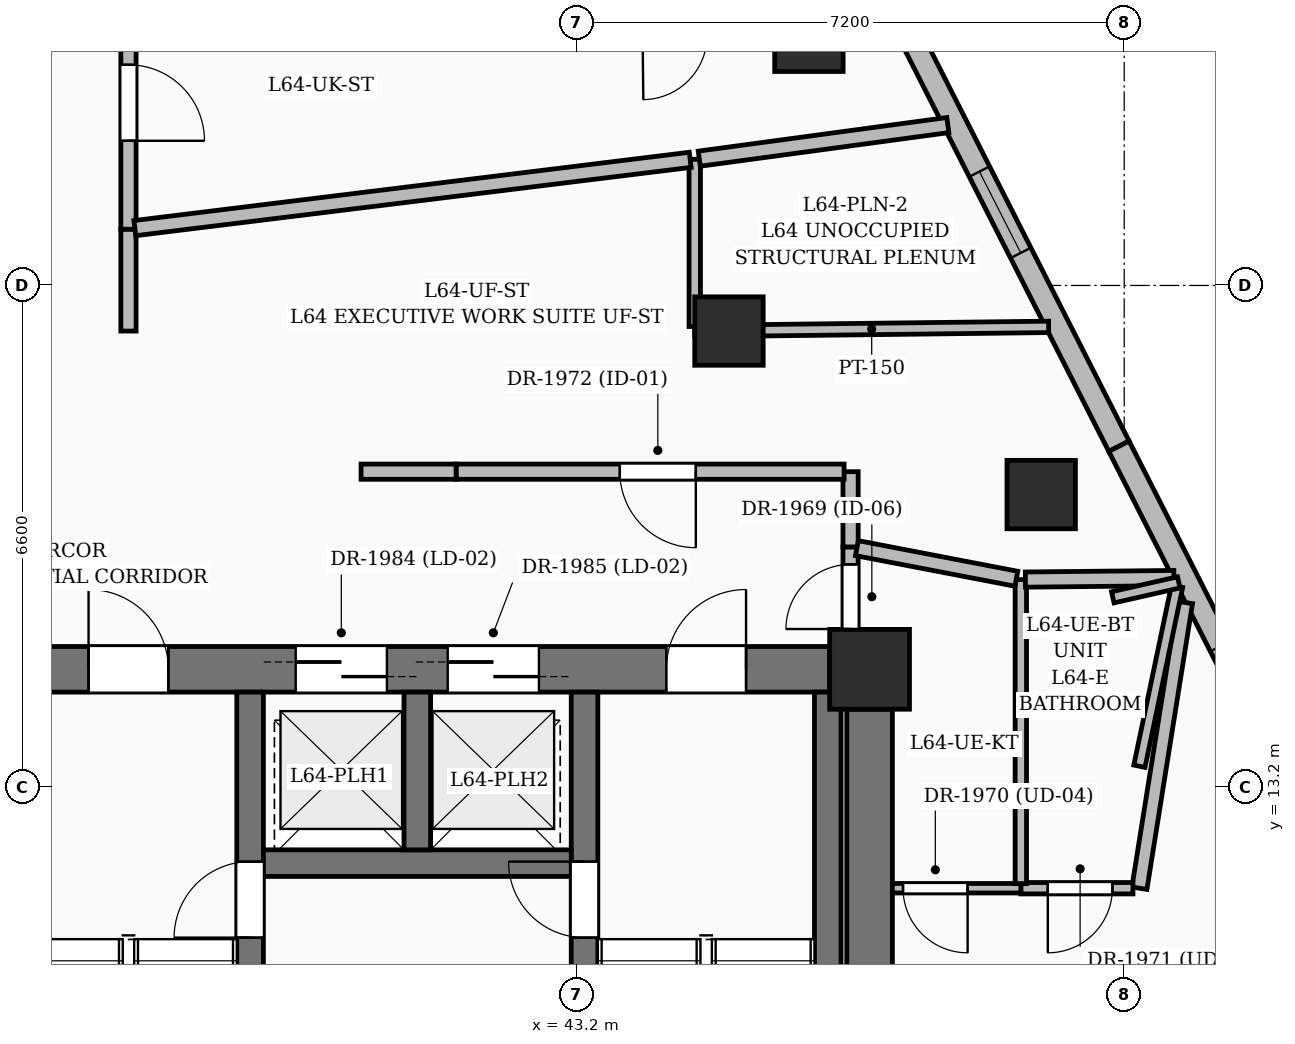
"""IFC4 building model, lengths in metres.
Left out: names, types, materials, properties, quantities, classifications, styles, units other than length and angle.
Written with IfcOpenShell. Run it as: python <this file> out.ifc"""

import sys

from ifc_helpers import new_model, si_unit, direction, frame, frame_2d, origin, origin_2d, place, context, subcontext, project, spatial, rectangle, extrude, element, fill, save


model = new_model("IFC4")
c1 = context("Model", 3, precision=1e-05, world=origin(), true_north=direction((0.0, 1.0)))
c2 = subcontext(c1, "Body", "Model", "MODEL_VIEW")
j1 = project(units=[si_unit("LENGTHUNIT", "METRE"), si_unit("PLANEANGLEUNIT", "RADIAN")], contexts=[c1])
p1 = place(None, origin())
s1 = spatial("IfcSite", under=j1, at=p1, CompositionType="ELEMENT")
p2 = place(p1, origin())
s2 = spatial("IfcBuilding", under=s1, at=p2, CompositionType="ELEMENT")
p3 = place(p2, frame((0.0, 0.0, 248.25)))
s3 = spatial("IfcBuildingStorey", under=s2, at=p3, CompositionType="ELEMENT", Elevation=248.25)
p4 = place(p3, frame((47.05, 14.75, 0.0), z_axis=(0.0, 0.0, 1.0), x_axis=(1.0, 0.0, 0.0)))
e1 = element("IfcColumn", 1, at=p4, inside=s3, PredefinedType="COLUMN", context=c2, shape_type="SweptSolid", body=[
    extrude(rectangle(XDim=1.05, YDim=1.05, at=origin_2d()), origin(), (0.0, 0.0, 1.0), 3.75),
])
p5 = place(p3, frame((45.2, 19.2, 0.0), z_axis=(0.0, 0.0, 1.0), x_axis=(1.0, 0.0, 0.0)))
e2 = element("IfcColumn", 2, at=p5, inside=s3, PredefinedType="COLUMN", context=c2, shape_type="SweptSolid", body=[
    extrude(rectangle(XDim=0.9, YDim=0.9, at=origin_2d()), origin(), (0.0, 0.0, 1.0), 3.75),
])
p6 = place(p3, frame((35.675, 14.75, 0.0), z_axis=(0.0, 0.0, 1.0), x_axis=(1.0, 0.0, 0.0)))
e3 = element("IfcWall", 3, at=p6, inside=s3, PredefinedType="SHEAR", context=c2, shape_type="SweptSolid", body=[
    extrude(rectangle(XDim=10.85, YDim=0.6, at=frame_2d((5.425, 0.0))), origin(), (0.0, 0.0, 1.0), 3.75),
])
p7 = place(p6, frame((1.1, 0.0, 0.0)))
e4 = element("IfcOpeningElement", 4, at=p7, cuts=e3, PredefinedType="OPENING", context=c2, shape_type="SweptSolid", body=[
    extrude(rectangle(XDim=1.05, YDim=2.15, at=frame_2d((0.525, 1.075))), frame((0.0, 0.31, 0.0), z_axis=(0.0, -1.0, 0.0), x_axis=(1.0, 0.0, 0.0)), (0.0, 0.0, 1.0), 0.62),
])
p8 = place(p6, frame((8.7, 0.0, 0.0)))
e5 = element("IfcOpeningElement", 5, at=p8, cuts=e3, PredefinedType="OPENING", context=c2, shape_type="SweptSolid", body=[
    extrude(rectangle(XDim=1.05, YDim=2.15, at=frame_2d((0.525, 1.075))), frame((0.0, 0.31, 0.0), z_axis=(0.0, -1.0, 0.0), x_axis=(1.0, 0.0, 0.0)), (0.0, 0.0, 1.0), 0.62),
])
p9 = place(p6, frame((3.825, 0.0, 0.0)))
e6 = element("IfcOpeningElement", 6, at=p9, cuts=e3, PredefinedType="OPENING", context=c2, shape_type="SweptSolid", body=[
    extrude(rectangle(XDim=1.2, YDim=2.2, at=frame_2d((0.6, 1.1))), frame((0.0, 0.31, 0.0), z_axis=(0.0, -1.0, 0.0), x_axis=(1.0, 0.0, 0.0)), (0.0, 0.0, 1.0), 0.62),
])
p10 = place(p6, frame((5.825, 0.0, 0.0)))
e7 = element("IfcOpeningElement", 7, at=p10, cuts=e3, PredefinedType="OPENING", context=c2, shape_type="SweptSolid", body=[
    extrude(rectangle(XDim=1.2, YDim=2.2, at=frame_2d((0.6, 1.1))), frame((0.0, 0.31, 0.0), z_axis=(0.0, -1.0, 0.0), x_axis=(1.0, 0.0, 0.0)), (0.0, 0.0, 1.0), 0.62),
])
p11 = place(p3, frame((47.05, 5.075, 0.0), z_axis=(0.0, 0.0, 1.0), x_axis=(0.0, 1.0, 0.0)))
e8 = element("IfcWall", 8, at=p11, inside=s3, PredefinedType="SHEAR", context=c2, shape_type="SweptSolid", body=[
    extrude(rectangle(XDim=9.15, YDim=0.6, at=frame_2d((4.575, 0.0))), origin(), (0.0, 0.0, 1.0), 3.75),
])
p12 = place(p3, frame((38.9, 5.2, 0.0), z_axis=(0.0, 0.0, 1.0), x_axis=(0.0, 1.0, 0.0)))
e9 = element("IfcWall", 9, at=p12, inside=s3, PredefinedType="SOLIDWALL", context=c2, shape_type="SweptSolid", body=[
    extrude(rectangle(XDim=9.25, YDim=0.35, at=frame_2d((4.625, 0.0))), origin(), (0.0, 0.0, 1.0), 3.75),
])
p13 = place(p12, frame((6.02, 0.0, 0.0)))
e10 = element("IfcOpeningElement", 10, at=p13, cuts=e9, PredefinedType="OPENING", context=c2, shape_type="SweptSolid", body=[
    extrude(rectangle(XDim=1.0, YDim=2.15, at=frame_2d((0.5, 1.075))), frame((0.0, 0.185, 0.0), z_axis=(0.0, -1.0, 0.0), x_axis=(1.0, 0.0, 0.0)), (0.0, 0.0, 1.0), 0.37),
])
p14 = place(p3, frame((43.3, 5.2, 0.0), z_axis=(0.0, 0.0, 1.0), x_axis=(0.0, 1.0, 0.0)))
e11 = element("IfcWall", 11, at=p14, inside=s3, PredefinedType="SOLIDWALL", context=c2, shape_type="SweptSolid", body=[
    extrude(rectangle(XDim=9.25, YDim=0.35, at=frame_2d((4.625, 0.0))), origin(), (0.0, 0.0, 1.0), 3.75),
])
p15 = place(p14, frame((6.02, 0.0, 0.0)))
e12 = element("IfcOpeningElement", 12, at=p15, cuts=e11, PredefinedType="OPENING", context=c2, shape_type="SweptSolid", body=[
    extrude(rectangle(XDim=1.0, YDim=2.15, at=frame_2d((0.5, 1.075))), frame((0.0, 0.185, 0.0), z_axis=(0.0, -1.0, 0.0), x_axis=(1.0, 0.0, 0.0)), (0.0, 0.0, 1.0), 0.37),
])
p16 = place(p3, frame((46.5, 5.2, 0.0), z_axis=(0.0, 0.0, 1.0), x_axis=(0.0, 1.0, 0.0)))
e13 = element("IfcWall", 13, at=p16, inside=s3, PredefinedType="SOLIDWALL", context=c2, shape_type="SweptSolid", body=[
    extrude(rectangle(XDim=9.25, YDim=0.35, at=frame_2d((4.625, 0.0))), origin(), (0.0, 0.0, 1.0), 3.75),
])
p17 = place(p3, frame((39.075, 12.2, 0.0), z_axis=(0.0, 0.0, 1.0), x_axis=(1.0, 0.0, 0.0)))
e14 = element("IfcWall", 14, at=p17, inside=s3, PredefinedType="SOLIDWALL", context=c2, shape_type="SweptSolid", body=[
    extrude(rectangle(XDim=4.05, YDim=0.35, at=frame_2d((2.025, 0.0))), origin(), (0.0, 0.0, 1.0), 3.75),
])
p18 = place(p3, frame((41.1, 12.375, 0.0), z_axis=(0.0, 0.0, 1.0), x_axis=(0.0, 1.0, 0.0)))
e15 = element("IfcWall", 15, at=p18, inside=s3, PredefinedType="SOLIDWALL", context=c2, shape_type="SweptSolid", body=[
    extrude(rectangle(XDim=2.075, YDim=0.35, at=frame_2d((1.038, 0.0))), origin(), (0.0, 0.0, 1.0), 3.75),
])
for number, where, z_axis, x_axis in (
    (16, (49.308, 17.049, 0.0), (0.0, 0.0, 1.0), (1.0, 0.0, 0.0)),
    (17, (46.252, 23.065, 0.0), (0.0, 0.0, 1.0), (1.0, 0.0, 0.0)),
):
    element("IfcColumn", number, at=place(p3, frame(where, z_axis=z_axis, x_axis=x_axis)), inside=s3, PredefinedType="COLUMN", context=c2, shape_type="SweptSolid", body=[
        extrude(rectangle(XDim=0.9, YDim=0.9, at=origin_2d()), origin(), (0.0, 0.0, 1.0), 3.75),
    ])
p19 = place(p3, frame((47.297, 23.656, 0.0), z_axis=(0.0, 0.0, 1.0), x_axis=(0.452876034441, -0.891573495248, 0.0)))
e18 = element("IfcWall", 18, at=p19, inside=s3, PredefinedType="SOLIDWALL", context=c2, shape_type="SweptSolid", body=[
    extrude(rectangle(XDim=6.698, YDim=0.3, at=frame_2d((3.349, 0.0))), origin(), (0.0, 0.0, 1.0), 3.5),
])
p20 = place(p19, frame((2.645, 0.0, 0.8)))
e19 = element("IfcOpeningElement", 19, at=p20, cuts=e18, PredefinedType="OPENING", context=c2, shape_type="SweptSolid", body=[
    extrude(rectangle(XDim=1.2, YDim=1.8, at=frame_2d((0.6, 0.9))), frame((0.0, 0.16, 0.0), z_axis=(0.0, -1.0, 0.0), x_axis=(1.0, 0.0, 0.0)), (0.0, 0.0, 1.0), 0.32),
])
p21 = place(p3, frame((50.331, 17.684, 0.0), z_axis=(0.0, 0.0, 1.0), x_axis=(0.452886204096, -0.891568329484, 0.0)))
e20 = element("IfcWall", 20, at=p21, inside=s3, PredefinedType="SOLIDWALL", context=c2, shape_type="SweptSolid", body=[
    extrude(rectangle(XDim=6.978, YDim=0.3, at=frame_2d((3.489, 0.0))), origin(), (0.0, 0.0, 1.0), 3.5),
])
p22 = place(p21, frame((2.95, 0.0, 0.6)))
e21 = element("IfcOpeningElement", 21, at=p22, cuts=e20, PredefinedType="OPENING", context=c2, shape_type="SweptSolid", body=[
    extrude(rectangle(XDim=2.4, YDim=2.1, at=frame_2d((1.2, 1.05))), frame((0.0, 0.16, 0.0), z_axis=(0.0, -1.0, 0.0), x_axis=(1.0, 0.0, 0.0)), (0.0, 0.0, 1.0), 0.32),
])
p23 = place(p3, frame((46.8, 15.05, 0.0), z_axis=(0.0, 0.0, 1.0), x_axis=(0.0, 1.0, 0.0)))
e22 = element("IfcWall", 22, at=p23, inside=s3, PredefinedType="PARTITIONING", context=c2, shape_type="SweptSolid", body=[
    extrude(rectangle(XDim=1.31, YDim=0.2, at=frame_2d((0.655, 0.0))), origin(), (0.0, 0.0, 1.0), 2.685),
])
p24 = place(p23, frame((0.23, 0.0, 0.0)))
e23 = element("IfcOpeningElement", 23, at=p24, cuts=e22, PredefinedType="OPENING", context=c2, shape_type="SweptSolid", body=[
    extrude(rectangle(XDim=0.85, YDim=2.1, at=frame_2d((0.425, 1.05))), frame((0.0, 0.11, 0.0), z_axis=(0.0, -1.0, 0.0), x_axis=(1.0, 0.0, 0.0)), (0.0, 0.0, 1.0), 0.22),
])
p25 = place(p3, frame((46.8, 16.36, 0.0), z_axis=(0.0, 0.0, 1.0), x_axis=(0.0, 1.0, 0.0)))
e24 = element("IfcWall", 24, at=p25, inside=s3, PredefinedType="PARTITIONING", context=c2, shape_type="SweptSolid", body=[
    extrude(rectangle(XDim=0.99, YDim=0.2, at=frame_2d((0.495, 0.0))), origin(), (0.0, 0.0, 1.0), 3.5),
])
p26 = place(p3, frame((46.715, 17.35, 0.0), z_axis=(0.0, 0.0, 1.0), x_axis=(-1.0, 0.0, 0.0)))
e25 = element("IfcWall", 25, at=p26, inside=s3, PredefinedType="PARTITIONING", context=c2, shape_type="SweptSolid", body=[
    extrude(rectangle(XDim=5.105, YDim=0.2, at=frame_2d((2.552, 0.0))), origin(), (0.0, 0.0, 1.0), 2.685),
])
p27 = place(p26, frame((1.951, 0.0, 0.0)))
e26 = element("IfcOpeningElement", 26, at=p27, cuts=e25, PredefinedType="OPENING", context=c2, shape_type="SweptSolid", body=[
    extrude(rectangle(XDim=1.0, YDim=2.2, at=frame_2d((0.5, 1.1))), frame((0.0, 0.11, 0.0), z_axis=(0.0, -1.0, 0.0), x_axis=(1.0, 0.0, 0.0)), (0.0, 0.0, 1.0), 0.22),
])
p28 = place(p3, frame((37.3, 19.2, 0.0), z_axis=(0.0, 0.0, 1.0), x_axis=(0.0, 1.0, 0.0)))
e27 = element("IfcWall", 27, at=p28, inside=s3, PredefinedType="PARTITIONING", context=c2, shape_type="SweptSolid", body=[
    extrude(rectangle(XDim=1.34, YDim=0.2, at=frame_2d((0.67, 0.0))), origin(), (0.0, 0.0, 1.0), 3.5),
])
p29 = place(p3, frame((37.3, 23.98, 0.0), z_axis=(0.0, 0.0, 1.0), x_axis=(0.0, -1.0, 0.0)))
e28 = element("IfcWall", 28, at=p29, inside=s3, PredefinedType="PARTITIONING", context=c2, shape_type="SweptSolid", body=[
    extrude(rectangle(XDim=3.44, YDim=0.2, at=frame_2d((1.72, 0.0))), origin(), (0.0, 0.0, 1.0), 3.5),
])
p30 = place(p29, frame((1.277, 0.0, 0.0)))
e29 = element("IfcOpeningElement", 29, at=p30, cuts=e28, PredefinedType="OPENING", context=c2, shape_type="SweptSolid", body=[
    extrude(rectangle(XDim=1.0, YDim=2.2, at=frame_2d((0.5, 1.1))), frame((0.0, 0.11, 0.0), z_axis=(0.0, -1.0, 0.0), x_axis=(1.0, 0.0, 0.0)), (0.0, 0.0, 1.0), 0.22),
])
p31 = place(p3, frame((51.2, 15.63, 0.0), z_axis=(0.0, 0.0, 1.0), x_axis=(-0.157552821355, -0.987510561201, 0.0)))
e30 = element("IfcWall", 30, at=p31, inside=s3, PredefinedType="PARTITIONING", context=c2, shape_type="SweptSolid", body=[
    extrude(rectangle(XDim=3.807, YDim=0.2, at=frame_2d((1.904, 0.0))), origin(), (0.0, 0.0, 1.0), 2.82),
])
p32 = place(p3, frame((50.515, 11.87, 0.0), z_axis=(0.0, 0.0, 1.0), x_axis=(-1.0, 0.0, 0.0)))
e31 = element("IfcWall", 31, at=p32, inside=s3, PredefinedType="PARTITIONING", context=c2, shape_type="SweptSolid", body=[
    extrude(rectangle(XDim=1.475, YDim=0.15, at=frame_2d((0.737, 0.0))), origin(), (0.0, 0.0, 1.0), 3.5),
])
p33 = place(p32, frame((0.27, 0.0, 0.0)))
e32 = element("IfcOpeningElement", 32, at=p33, cuts=e31, PredefinedType="OPENING", context=c2, shape_type="SweptSolid", body=[
    extrude(rectangle(XDim=0.85, YDim=2.1, at=frame_2d((0.425, 1.05))), frame((0.0, 0.085, 0.0), z_axis=(0.0, -1.0, 0.0), x_axis=(1.0, 0.0, 0.0)), (0.0, 0.0, 1.0), 0.17),
])
p34 = place(p3, frame((49.04, 11.87, 0.0), z_axis=(0.0, 0.0, 1.0), x_axis=(-1.0, 0.0, 0.0)))
e33 = element("IfcWall", 33, at=p34, inside=s3, PredefinedType="PARTITIONING", context=c2, shape_type="SweptSolid", body=[
    extrude(rectangle(XDim=1.69, YDim=0.125, at=frame_2d((0.845, 0.0))), origin(), (0.0, 0.0, 1.0), 3.5),
])
p35 = place(p34, frame((0.7, 0.0, 0.0)))
e34 = element("IfcOpeningElement", 34, at=p35, cuts=e33, PredefinedType="OPENING", context=c2, shape_type="SweptSolid", body=[
    extrude(rectangle(XDim=0.85, YDim=2.1, at=frame_2d((0.425, 1.05))), frame((0.0, 0.072, 0.0), z_axis=(0.0, -1.0, 0.0), x_axis=(1.0, 0.0, 0.0)), (0.0, 0.0, 1.0), 0.145),
])
p36 = place(p3, frame((49.04, 15.93, 0.0), z_axis=(0.0, 0.0, 1.0), x_axis=(0.0, -1.0, 0.0)))
e35 = element("IfcWall", 35, at=p36, inside=s3, PredefinedType="PARTITIONING", context=c2, shape_type="SweptSolid", body=[
    extrude(rectangle(XDim=4.0, YDim=0.15, at=frame_2d((2.0, 0.0))), origin(), (0.0, 0.0, 1.0), 3.5),
])
p37 = place(p3, frame((51.054, 15.95, 0.0), z_axis=(0.0, 0.0, 1.0), x_axis=(-0.999947512259, -0.010245619893, 0.0)))
e36 = element("IfcWall", 36, at=p37, inside=s3, PredefinedType="PARTITIONING", context=c2, shape_type="SweptSolid", body=[
    extrude(rectangle(XDim=1.954, YDim=0.2, at=frame_2d((0.977, 0.0))), origin(), (0.0, 0.0, 1.0), 2.82),
])
p38 = place(p3, frame((48.981, 15.941, 0.0), z_axis=(0.0, 0.0, 1.0), x_axis=(-0.982076492774, 0.188482790571, 0.0)))
e37 = element("IfcWall", 37, at=p38, inside=s3, PredefinedType="PARTITIONING", context=c2, shape_type="SweptSolid", body=[
    extrude(rectangle(XDim=2.136, YDim=0.2, at=frame_2d((1.068, 0.0))), origin(), (0.0, 0.0, 1.0), 3.5),
])
p39 = place(p3, frame((49.406, 19.255, 0.0), z_axis=(0.0, 0.0, 1.0), x_axis=(-0.999930410651, -0.011797196917, 0.0)))
e38 = element("IfcWall", 38, at=p39, inside=s3, PredefinedType="PARTITIONING", context=c2, shape_type="SweptSolid", body=[
    extrude(rectangle(XDim=4.656, YDim=0.15, at=frame_2d((2.328, 0.0))), origin(), (0.0, 0.0, 1.0), 2.82),
])
p40 = place(p3, frame((44.75, 19.26, 0.0), z_axis=(0.0, 0.0, 1.0), x_axis=(0.0, 1.0, 0.0)))
e39 = element("IfcWall", 39, at=p40, inside=s3, PredefinedType="PARTITIONING", context=c2, shape_type="SweptSolid", body=[
    extrude(rectangle(XDim=2.2, YDim=0.15, at=frame_2d((1.1, 0.0))), origin(), (0.0, 0.0, 1.0), 1.27),
])
p41 = place(p3, frame((44.69, 21.453, 0.0), z_axis=(0.0, 0.0, 1.0), x_axis=(-0.992524860777, -0.12204261854, 0.0)))
e40 = element("IfcWall", 40, at=p41, inside=s3, PredefinedType="PARTITIONING", context=c2, shape_type="SweptSolid", body=[
    extrude(rectangle(XDim=7.362, YDim=0.2, at=frame_2d((3.681, 0.0))), origin(), (0.0, 0.0, 1.0), 2.685),
])
p42 = place(p3, frame((48.08, 21.91, 0.0), z_axis=(0.0, 0.0, 1.0), x_axis=(-0.990985264869, -0.133970910322, 0.0)))
e41 = element("IfcWall", 41, at=p42, inside=s3, PredefinedType="PARTITIONING", context=c2, shape_type="SweptSolid", body=[
    extrude(rectangle(XDim=3.3, YDim=0.2, at=frame_2d((1.65, 0.0))), origin(), (0.0, 0.0, 1.0), 1.27),
])
p43 = place(p3, frame((41.61, 17.35, 0.0), z_axis=(0.0, 0.0, 1.0), x_axis=(-1.0, 0.0, 0.0)))
e42 = element("IfcWall", 42, at=p43, inside=s3, PredefinedType="PARTITIONING", context=c2, shape_type="SweptSolid", body=[
    extrude(rectangle(XDim=1.25, YDim=0.2, at=frame_2d((0.625, 0.0))), origin(), (0.0, 0.0, 1.0), 3.5),
])
p44 = place(p3, frame((50.6, 13.475, 0.0), z_axis=(0.0, 0.0, 1.0), x_axis=(0.204860905719, 0.978791095846, 0.0)))
e43 = element("IfcWall", 43, at=p44, inside=s3, PredefinedType="PARTITIONING", context=c2, shape_type="SweptSolid", body=[
    extrude(rectangle(XDim=2.419, YDim=0.15, at=frame_2d((1.209, 0.0))), origin(), (0.0, 0.0, 1.0), 2.82),
])
p45 = place(p3, frame((51.118, 15.894, 0.0), z_axis=(0.0, 0.0, 1.0), x_axis=(-0.975189411554, -0.221372111146, 0.0)))
e44 = element("IfcWall", 44, at=p45, inside=s3, PredefinedType="PARTITIONING", context=c2, shape_type="SweptSolid", body=[
    extrude(rectangle(XDim=0.89, YDim=0.15, at=frame_2d((0.445, 0.0))), origin(), (0.0, 0.0, 1.0), 2.82),
])
p46 = place(p20, origin())
e45 = element("IfcWindow", 45, at=p46, inside=s3, PartitioningType="SINGLE_PANEL", PredefinedType="WINDOW", context=c2, shape_type="SweptSolid", body=[
    extrude(rectangle(XDim=1.2, YDim=1.8, at=frame_2d((0.6, 0.9))), frame((0.0, 0.03, 0.0), z_axis=(0.0, -1.0, 0.0), x_axis=(1.0, 0.0, 0.0)), (0.0, 0.0, 1.0), 0.06),
])
fill(e19, e45)
p47 = place(p7, origin())
e46 = element("IfcDoor", 46, at=p47, inside=s3, OperationType="SINGLE_SWING_LEFT", PredefinedType="DOOR", context=c2, shape_type="SweptSolid", body=[
    extrude(rectangle(XDim=1.05, YDim=2.15, at=frame_2d((0.525, 1.075))), frame((0.0, 0.025, 0.0), z_axis=(0.0, -1.0, 0.0), x_axis=(1.0, 0.0, 0.0)), (0.0, 0.0, 1.0), 0.05),
])
fill(e4, e46)
p48 = place(p8, origin())
e47 = element("IfcDoor", 47, at=p48, inside=s3, OperationType="SINGLE_SWING_RIGHT", PredefinedType="DOOR", context=c2, shape_type="SweptSolid", body=[
    extrude(rectangle(XDim=1.05, YDim=2.15, at=frame_2d((0.525, 1.075))), frame((0.0, 0.025, 0.0), z_axis=(0.0, -1.0, 0.0), x_axis=(1.0, 0.0, 0.0)), (0.0, 0.0, 1.0), 0.05),
])
fill(e5, e47)
p49 = place(p13, origin())
e48 = element("IfcDoor", 48, at=p49, inside=s3, OperationType="SINGLE_SWING_LEFT", PredefinedType="DOOR", context=c2, shape_type="SweptSolid", body=[
    extrude(rectangle(XDim=1.0, YDim=2.15, at=frame_2d((0.5, 1.075))), frame((0.0, 0.025, 0.0), z_axis=(0.0, -1.0, 0.0), x_axis=(1.0, 0.0, 0.0)), (0.0, 0.0, 1.0), 0.05),
])
fill(e10, e48)
p50 = place(p15, origin())
e49 = element("IfcDoor", 49, at=p50, inside=s3, OperationType="SINGLE_SWING_RIGHT", PredefinedType="DOOR", context=c2, shape_type="SweptSolid", body=[
    extrude(rectangle(XDim=1.0, YDim=2.15, at=frame_2d((0.5, 1.075))), frame((0.0, 0.025, 0.0), z_axis=(0.0, -1.0, 0.0), x_axis=(1.0, 0.0, 0.0)), (0.0, 0.0, 1.0), 0.05),
])
fill(e12, e49)
p51 = place(p9, origin())
e50 = element("IfcDoor", 50, at=p51, inside=s3, OperationType="DOUBLE_DOOR_SLIDING", PredefinedType="DOOR", context=c2, shape_type="SweptSolid", body=[
    extrude(rectangle(XDim=1.2, YDim=2.2, at=frame_2d((0.6, 1.1))), frame((0.0, 0.025, 0.0), z_axis=(0.0, -1.0, 0.0), x_axis=(1.0, 0.0, 0.0)), (0.0, 0.0, 1.0), 0.05),
])
fill(e6, e50)
p52 = place(p10, origin())
e51 = element("IfcDoor", 51, at=p52, inside=s3, OperationType="DOUBLE_DOOR_SLIDING", PredefinedType="DOOR", context=c2, shape_type="SweptSolid", body=[
    extrude(rectangle(XDim=1.2, YDim=2.2, at=frame_2d((0.6, 1.1))), frame((0.0, 0.025, 0.0), z_axis=(0.0, -1.0, 0.0), x_axis=(1.0, 0.0, 0.0)), (0.0, 0.0, 1.0), 0.05),
])
fill(e7, e51)
p53 = place(p24, origin())
e52 = element("IfcDoor", 52, at=p53, inside=s3, OperationType="SINGLE_SWING_LEFT", PredefinedType="DOOR", context=c2, shape_type="SweptSolid", body=[
    extrude(rectangle(XDim=0.85, YDim=2.1, at=frame_2d((0.425, 1.05))), frame((0.0, 0.025, 0.0), z_axis=(0.0, -1.0, 0.0), x_axis=(1.0, 0.0, 0.0)), (0.0, 0.0, 1.0), 0.05),
])
fill(e23, e52)
p54 = place(p35, origin())
e53 = element("IfcDoor", 53, at=p54, inside=s3, OperationType="SINGLE_SWING_LEFT", PredefinedType="DOOR", context=c2, shape_type="SweptSolid", body=[
    extrude(rectangle(XDim=0.85, YDim=2.1, at=frame_2d((0.425, 1.05))), frame((0.0, 0.025, 0.0), z_axis=(0.0, -1.0, 0.0), x_axis=(1.0, 0.0, 0.0)), (0.0, 0.0, 1.0), 0.05),
])
fill(e34, e53)
p55 = place(p33, origin())
e54 = element("IfcDoor", 54, at=p55, inside=s3, OperationType="SINGLE_SWING_RIGHT", PredefinedType="DOOR", context=c2, shape_type="SweptSolid", body=[
    extrude(rectangle(XDim=0.85, YDim=2.1, at=frame_2d((0.425, 1.05))), frame((0.0, 0.025, 0.0), z_axis=(0.0, -1.0, 0.0), x_axis=(1.0, 0.0, 0.0)), (0.0, 0.0, 1.0), 0.05),
])
fill(e32, e54)
p56 = place(p27, origin())
e55 = element("IfcDoor", 55, at=p56, inside=s3, OperationType="SINGLE_SWING_LEFT", PredefinedType="DOOR", context=c2, shape_type="SweptSolid", body=[
    extrude(rectangle(XDim=1.0, YDim=2.2, at=frame_2d((0.5, 1.1))), frame((0.0, 0.025, 0.0), z_axis=(0.0, -1.0, 0.0), x_axis=(1.0, 0.0, 0.0)), (0.0, 0.0, 1.0), 0.05),
])
fill(e26, e55)
p57 = place(p30, origin())
e56 = element("IfcDoor", 56, at=p57, inside=s3, OperationType="SINGLE_SWING_RIGHT", PredefinedType="DOOR", context=c2, shape_type="SweptSolid", body=[
    extrude(rectangle(XDim=1.0, YDim=2.2, at=frame_2d((0.5, 1.1))), frame((0.0, 0.025, 0.0), z_axis=(0.0, -1.0, 0.0), x_axis=(1.0, 0.0, 0.0)), (0.0, 0.0, 1.0), 0.05),
])
fill(e29, e56)
save(model, sys.argv[1])
